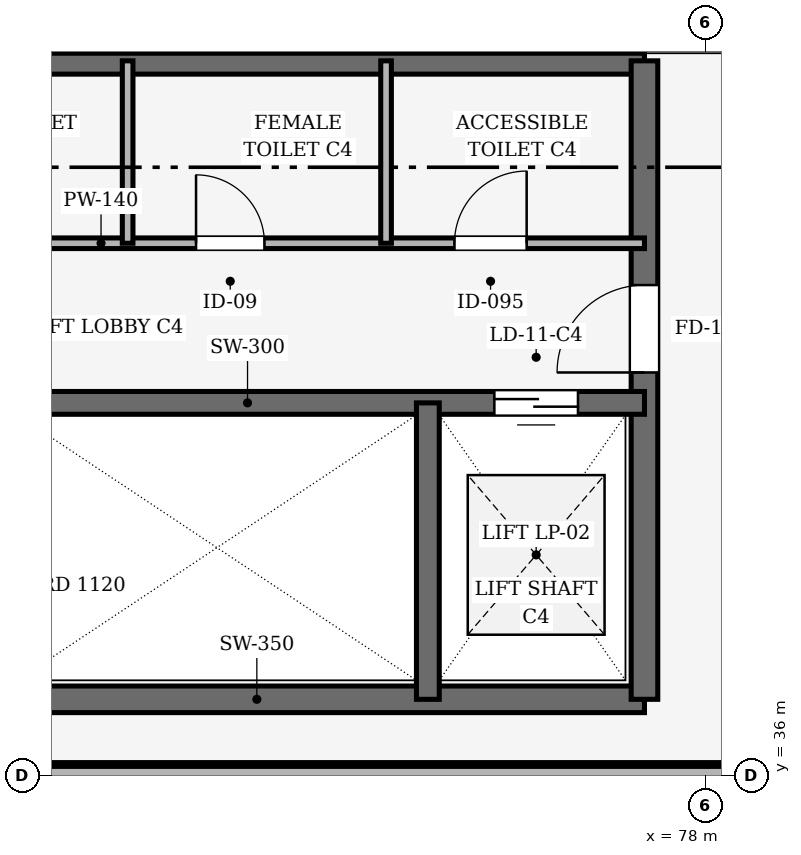
"""IFC4 building model, lengths in metres.
Left out: names, types, materials, properties, quantities, classifications, styles, units other than length and angle.
Written with IfcOpenShell. Run it as: python <this file> out.ifc"""

import sys

from ifc_helpers import new_model, si_unit, direction, frame, frame_2d, origin, place, context, subcontext, project, spatial, rectangle, extrude, element, fill, save


model = new_model("IFC4")
c1 = context("Model", 3, precision=1e-05, world=origin(), true_north=direction((0.0, 1.0)))
c2 = subcontext(c1, "Body", "Model", "MODEL_VIEW")
j1 = project(units=[si_unit("LENGTHUNIT", "METRE"), si_unit("PLANEANGLEUNIT", "RADIAN")], contexts=[c1])
p1 = place(None, origin())
s1 = spatial("IfcSite", under=j1, at=p1, CompositionType="ELEMENT")
p2 = place(p1, origin())
s2 = spatial("IfcBuilding", under=s1, at=p2, CompositionType="ELEMENT")
p3 = place(p2, frame((0.0, 0.0, 10.8)))
s3 = spatial("IfcBuildingStorey", under=s2, at=p3, CompositionType="ELEMENT", Elevation=10.8)
p4 = place(p3, frame((66.0, 36.0, 0.0), z_axis=(0.0, 0.0, 1.0), x_axis=(1.0, 0.0, 0.0)))
e1 = element("IfcWall", 1, at=p4, inside=s3, PredefinedType="SOLIDWALL", context=c2, shape_type="SweptSolid", body=[
    extrude(rectangle(XDim=48.0, YDim=0.335, at=frame_2d((24.0, 0.0))), origin(), (0.0, 0.0, 1.0), 4.3),
])
p5 = place(p3, frame((66.0, 36.0, 5.01), z_axis=(0.0, 0.0, 1.0), x_axis=(1.0, 0.0, 0.0)))
e2 = element("IfcWall", 2, at=p5, inside=s3, PredefinedType="PARAPET", context=c2, shape_type="SweptSolid", body=[
    extrude(rectangle(XDim=48.0, YDim=0.235, at=frame_2d((24.0, 0.0))), origin(), (0.0, 0.0, 1.0), 1.14),
])
for number, where, z_axis, x_axis in (
    (3, (67.0, 37.0, 0.0), (0.0, 0.0, 1.0), (1.0, 0.0, 0.0)),
    (4, (77.2, 45.4, 0.0), (0.0, 0.0, 1.0), (-1.0, 0.0, 0.0)),
):
    element("IfcWall", number, at=place(p3, frame(where, z_axis=z_axis, x_axis=x_axis)), inside=s3, PredefinedType="SHEAR", context=c2, shape_type="SweptSolid", body=[
        extrude(rectangle(XDim=10.2, YDim=0.35, at=frame_2d((5.1, 0.0))), origin(), (0.0, 0.0, 1.0), 5.4),
    ])
p6 = place(p3, frame((77.2, 37.0, 0.0), z_axis=(0.0, 0.0, 1.0), x_axis=(0.0, 1.0, 0.0)))
e5 = element("IfcWall", 5, at=p6, inside=s3, PredefinedType="SHEAR", context=c2, shape_type="SweptSolid", body=[
    extrude(rectangle(XDim=8.4, YDim=0.35, at=frame_2d((4.2, 0.0))), origin(), (0.0, 0.0, 1.0), 5.4),
])
p7 = place(p6, frame((4.3, 0.0, 0.0)))
e6 = element("IfcOpeningElement", 6, at=p7, cuts=e5, PredefinedType="OPENING", context=c2, shape_type="SweptSolid", body=[
    extrude(rectangle(XDim=1.15, YDim=2.15, at=frame_2d((0.575, 1.075))), frame((0.0, 0.185, 0.0), z_axis=(0.0, -1.0, 0.0), x_axis=(1.0, 0.0, 0.0)), (0.0, 0.0, 1.0), 0.37),
])
p8 = place(p3, frame((67.0, 40.9, 0.0), z_axis=(0.0, 0.0, 1.0), x_axis=(1.0, 0.0, 0.0)))
e7 = element("IfcWall", 7, at=p8, inside=s3, PredefinedType="SHEAR", context=c2, shape_type="SweptSolid", body=[
    extrude(rectangle(XDim=10.2, YDim=0.3, at=frame_2d((5.1, 0.0))), origin(), (0.0, 0.0, 1.0), 5.4),
])
p9 = place(p8, frame((0.28, 0.0, 0.0)))
e8 = element("IfcOpeningElement", 8, at=p9, cuts=e7, PredefinedType="OPENING", context=c2, shape_type="SweptSolid", body=[
    extrude(rectangle(XDim=1.45, YDim=2.15, at=frame_2d((0.725, 1.075))), frame((0.0, 0.16, 0.0), z_axis=(0.0, -1.0, 0.0), x_axis=(1.0, 0.0, 0.0)), (0.0, 0.0, 1.0), 0.32),
])
p10 = place(p8, frame((8.225, 0.0, 0.0)))
e9 = element("IfcOpeningElement", 9, at=p10, cuts=e7, PredefinedType="OPENING", context=c2, shape_type="SweptSolid", body=[
    extrude(rectangle(XDim=1.1, YDim=2.15, at=frame_2d((0.55, 1.075))), frame((0.0, 0.16, 0.0), z_axis=(0.0, -1.0, 0.0), x_axis=(1.0, 0.0, 0.0)), (0.0, 0.0, 1.0), 0.32),
])
p11 = place(p3, frame((74.35, 37.0, 0.0), z_axis=(0.0, 0.0, 1.0), x_axis=(0.0, 1.0, 0.0)))
e10 = element("IfcWall", 10, at=p11, inside=s3, PredefinedType="SHEAR", context=c2, shape_type="SweptSolid", body=[
    extrude(rectangle(XDim=3.9, YDim=0.3, at=frame_2d((1.95, 0.0))), origin(), (0.0, 0.0, 1.0), 5.4),
])
p12 = place(p3, frame((67.0, 43.0, 0.0), z_axis=(0.0, 0.0, 1.0), x_axis=(1.0, 0.0, 0.0)))
e11 = element("IfcWall", 11, at=p12, inside=s3, PredefinedType="PARTITIONING", context=c2, shape_type="SweptSolid", body=[
    extrude(rectangle(XDim=10.2, YDim=0.14, at=frame_2d((5.1, 0.0))), origin(), (0.0, 0.0, 1.0), 4.455),
])
p13 = place(p12, frame((0.9, 0.0, 0.0)))
e12 = element("IfcOpeningElement", 12, at=p13, cuts=e11, PredefinedType="OPENING", context=c2, shape_type="SweptSolid", body=[
    extrude(rectangle(XDim=0.9, YDim=2.1, at=frame_2d((0.45, 1.05))), frame((0.0, 0.08, 0.0), z_axis=(0.0, -1.0, 0.0), x_axis=(1.0, 0.0, 0.0)), (0.0, 0.0, 1.0), 0.16),
])
p14 = place(p12, frame((4.3, 0.0, 0.0)))
e13 = element("IfcOpeningElement", 13, at=p14, cuts=e11, PredefinedType="OPENING", context=c2, shape_type="SweptSolid", body=[
    extrude(rectangle(XDim=0.9, YDim=2.1, at=frame_2d((0.45, 1.05))), frame((0.0, 0.08, 0.0), z_axis=(0.0, -1.0, 0.0), x_axis=(1.0, 0.0, 0.0)), (0.0, 0.0, 1.0), 0.16),
])
p15 = place(p12, frame((7.7, 0.0, 0.0)))
e14 = element("IfcOpeningElement", 14, at=p15, cuts=e11, PredefinedType="OPENING", context=c2, shape_type="SweptSolid", body=[
    extrude(rectangle(XDim=0.95, YDim=2.1, at=frame_2d((0.475, 1.05))), frame((0.0, 0.08, 0.0), z_axis=(0.0, -1.0, 0.0), x_axis=(1.0, 0.0, 0.0)), (0.0, 0.0, 1.0), 0.16),
])
for number, where, z_axis, x_axis in (
    (15, (70.4, 43.0, 0.0), (0.0, 0.0, 1.0), (0.0, 1.0, 0.0)),
    (16, (73.8, 43.0, 0.0), (0.0, 0.0, 1.0), (0.0, 1.0, 0.0)),
):
    element("IfcWall", number, at=place(p3, frame(where, z_axis=z_axis, x_axis=x_axis)), inside=s3, PredefinedType="PARTITIONING", context=c2, shape_type="SweptSolid", body=[
        extrude(rectangle(XDim=2.4, YDim=0.14, at=frame_2d((1.2, 0.0))), origin(), (0.0, 0.0, 1.0), 4.5),
    ])
p16 = place(p7, origin())
e17 = element("IfcDoor", 17, at=p16, inside=s3, OperationType="SINGLE_SWING_LEFT", PredefinedType="DOOR", context=c2, shape_type="SweptSolid", body=[
    extrude(rectangle(XDim=1.15, YDim=2.15, at=frame_2d((0.575, 1.075))), frame((0.0, 0.025, 0.0), z_axis=(0.0, -1.0, 0.0), x_axis=(1.0, 0.0, 0.0)), (0.0, 0.0, 1.0), 0.05),
])
fill(e6, e17)
p17 = place(p10, origin())
e18 = element("IfcDoor", 18, at=p17, inside=s3, OperationType="DOUBLE_DOOR_SLIDING", PredefinedType="DOOR", context=c2, shape_type="SweptSolid", body=[
    extrude(rectangle(XDim=1.1, YDim=2.15, at=frame_2d((0.55, 1.075))), frame((0.0, 0.025, 0.0), z_axis=(0.0, -1.0, 0.0), x_axis=(1.0, 0.0, 0.0)), (0.0, 0.0, 1.0), 0.05),
])
fill(e9, e18)
p18 = place(p14, origin())
e19 = element("IfcDoor", 19, at=p18, inside=s3, OperationType="SINGLE_SWING_LEFT", PredefinedType="DOOR", context=c2, shape_type="SweptSolid", body=[
    extrude(rectangle(XDim=0.9, YDim=2.1, at=frame_2d((0.45, 1.05))), frame((0.0, 0.025, 0.0), z_axis=(0.0, -1.0, 0.0), x_axis=(1.0, 0.0, 0.0)), (0.0, 0.0, 1.0), 0.05),
])
fill(e13, e19)
p19 = place(p15, origin())
e20 = element("IfcDoor", 20, at=p19, inside=s3, OperationType="SINGLE_SWING_RIGHT", PredefinedType="DOOR", context=c2, shape_type="SweptSolid", body=[
    extrude(rectangle(XDim=0.95, YDim=2.1, at=frame_2d((0.475, 1.05))), frame((0.0, 0.025, 0.0), z_axis=(0.0, -1.0, 0.0), x_axis=(1.0, 0.0, 0.0)), (0.0, 0.0, 1.0), 0.05),
])
fill(e14, e20)
save(model, sys.argv[1])
